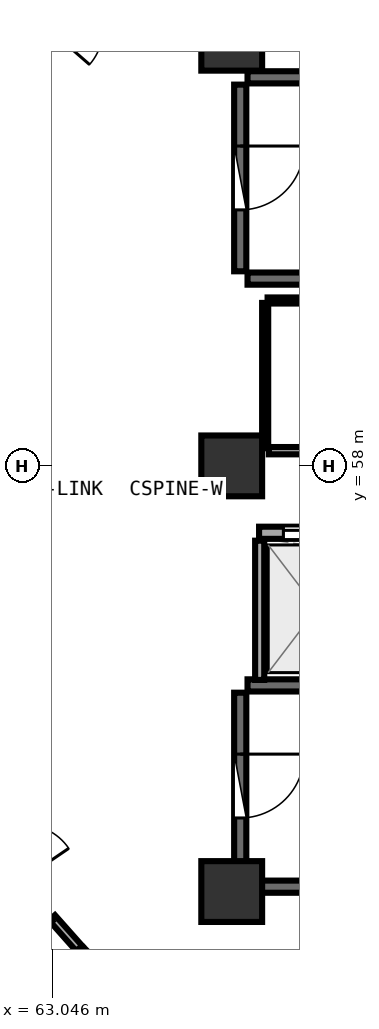
"""IFC4 building model, lengths in metres.
Left out: names, types, materials, properties, quantities, classifications, styles, units other than length and angle.
Written with IfcOpenShell. Run it as: python <this file> out.ifc"""

import sys

from ifc_helpers import new_model, si_unit, direction, frame, frame_2d, origin, origin_2d, place, context, subcontext, project, spatial, rectangle, extrude, element, fill, save


model = new_model("IFC4")
c1 = context("Model", 3, precision=1e-05, world=origin(), true_north=direction((0.0, 1.0)))
c2 = subcontext(c1, "Body", "Model", "MODEL_VIEW")
j1 = project(units=[si_unit("LENGTHUNIT", "METRE"), si_unit("PLANEANGLEUNIT", "RADIAN")], contexts=[c1])
p1 = place(None, origin())
s1 = spatial("IfcSite", under=j1, at=p1, CompositionType="ELEMENT")
p2 = place(p1, origin())
s2 = spatial("IfcBuilding", under=s1, at=p2, CompositionType="ELEMENT")
p3 = place(p2, frame((0.0, 0.0, 234.45)))
s3 = spatial("IfcBuildingStorey", under=s2, at=p3, CompositionType="ELEMENT", Elevation=234.45)
for number, where, z_axis, x_axis in (
    (1, (66.0, 51.0, 0.0), (0.0, 0.0, 1.0), (1.0, 0.0, 0.0)),
    (2, (66.0, 65.0, 0.0), (0.0, 0.0, 1.0), (1.0, 0.0, 0.0)),
    (3, (66.0, 58.0, 0.0), (0.0, 0.0, 1.0), (1.0, 0.0, 0.0)),
):
    element("IfcColumn", number, at=place(p3, frame(where, z_axis=z_axis, x_axis=x_axis)), inside=s3, PredefinedType="PILASTER", context=c2, shape_type="SweptSolid", body=[
        extrude(rectangle(XDim=1.0, YDim=1.0, at=origin_2d()), origin(), (0.0, 0.0, 1.0), 3.75),
    ])
for number, where, z_axis, x_axis in (
    (4, (66.26, 61.08, 0.0), (0.0, 0.0, 1.0), (1.0, 0.0, 0.0)),
    (5, (73.42, 64.39, 0.0), (0.0, 0.0, 1.0), (-1.0, 0.0, 0.0)),
):
    element("IfcWall", number, at=place(p3, frame(where, z_axis=z_axis, x_axis=x_axis)), inside=s3, PredefinedType="SHEAR", context=c2, shape_type="SweptSolid", body=[
        extrude(rectangle(XDim=7.16, YDim=0.2, at=frame_2d((3.58, 0.0))), origin(), (0.0, 0.0, 1.0), 3.49),
    ])
p4 = place(p3, frame((66.14, 64.27, 0.0), z_axis=(0.0, 0.0, 1.0), x_axis=(0.0, -1.0, 0.0)))
e6 = element("IfcWall", 6, at=p4, inside=s3, PredefinedType="SHEAR", context=c2, shape_type="SweptSolid", body=[
    extrude(rectangle(XDim=3.07, YDim=0.2, at=frame_2d((1.535, 0.0))), origin(), (0.0, 0.0, 1.0), 3.49),
])
p5 = place(p4, frame((1.01, 0.0, 0.0)))
e7 = element("IfcOpeningElement", 7, at=p5, cuts=e6, PredefinedType="OPENING", context=c2, shape_type="SweptSolid", body=[
    extrude(rectangle(XDim=1.05, YDim=2.1, at=frame_2d((0.525, 1.05))), frame((0.0, 0.11, 0.0), z_axis=(0.0, -1.0, 0.0), x_axis=(1.0, 0.0, 0.0)), (0.0, 0.0, 1.0), 0.22),
])
for number, where, z_axis, x_axis in (
    (8, (66.26, 51.08, 0.0), (0.0, 0.0, 1.0), (1.0, 0.0, 0.0)),
    (9, (73.42, 54.39, 0.0), (0.0, 0.0, 1.0), (-1.0, 0.0, 0.0)),
):
    element("IfcWall", number, at=place(p3, frame(where, z_axis=z_axis, x_axis=x_axis)), inside=s3, PredefinedType="SHEAR", context=c2, shape_type="SweptSolid", body=[
        extrude(rectangle(XDim=7.16, YDim=0.2, at=frame_2d((3.58, 0.0))), origin(), (0.0, 0.0, 1.0), 3.49),
    ])
p6 = place(p3, frame((66.14, 54.27, 0.0), z_axis=(0.0, 0.0, 1.0), x_axis=(0.0, -1.0, 0.0)))
e10 = element("IfcWall", 10, at=p6, inside=s3, PredefinedType="SHEAR", context=c2, shape_type="SweptSolid", body=[
    extrude(rectangle(XDim=3.07, YDim=0.2, at=frame_2d((1.535, 0.0))), origin(), (0.0, 0.0, 1.0), 3.49),
])
p7 = place(p6, frame((1.01, 0.0, 0.0)))
e11 = element("IfcOpeningElement", 11, at=p7, cuts=e10, PredefinedType="OPENING", context=c2, shape_type="SweptSolid", body=[
    extrude(rectangle(XDim=1.05, YDim=2.1, at=frame_2d((0.525, 1.05))), frame((0.0, 0.11, 0.0), z_axis=(0.0, -1.0, 0.0), x_axis=(1.0, 0.0, 0.0)), (0.0, 0.0, 1.0), 0.22),
])
p8 = place(p3, frame((66.45, 56.9, 0.0), z_axis=(0.0, 0.0, 1.0), x_axis=(1.0, 0.0, 0.0)))
e12 = element("IfcWall", 12, at=p8, inside=s3, PredefinedType="SOLIDWALL", context=c2, shape_type="SweptSolid", body=[
    extrude(rectangle(XDim=14.4, YDim=0.2, at=frame_2d((7.2, 0.0))), origin(), (0.0, 0.0, 1.0), 3.48),
])
p9 = place(p8, frame((0.4, 0.0, 0.0)))
e13 = element("IfcOpeningElement", 13, at=p9, cuts=e12, PredefinedType="OPENING", context=c2, shape_type="SweptSolid", body=[
    extrude(rectangle(XDim=1.1, YDim=2.1, at=frame_2d((0.55, 1.05))), frame((0.0, 0.11, 0.0), z_axis=(0.0, -1.0, 0.0), x_axis=(1.0, 0.0, 0.0)), (0.0, 0.0, 1.0), 0.22),
])
p10 = place(p8, frame((2.4, 0.0, 0.0)))
e14 = element("IfcOpeningElement", 14, at=p10, cuts=e12, PredefinedType="OPENING", context=c2, shape_type="SweptSolid", body=[
    extrude(rectangle(XDim=1.1, YDim=2.1, at=frame_2d((0.55, 1.05))), frame((0.0, 0.11, 0.0), z_axis=(0.0, -1.0, 0.0), x_axis=(1.0, 0.0, 0.0)), (0.0, 0.0, 1.0), 0.22),
])
p11 = place(p8, frame((4.4, 0.0, 0.0)))
e15 = element("IfcOpeningElement", 15, at=p11, cuts=e12, PredefinedType="OPENING", context=c2, shape_type="SweptSolid", body=[
    extrude(rectangle(XDim=1.1, YDim=2.1, at=frame_2d((0.55, 1.05))), frame((0.0, 0.11, 0.0), z_axis=(0.0, -1.0, 0.0), x_axis=(1.0, 0.0, 0.0)), (0.0, 0.0, 1.0), 0.22),
])
p12 = place(p3, frame((66.46, 54.48, 0.0), z_axis=(0.0, 0.0, 1.0), x_axis=(0.0, 1.0, 0.0)))
e16 = element("IfcWall", 16, at=p12, inside=s3, PredefinedType="PARTITIONING", context=c2, shape_type="SweptSolid", body=[
    extrude(rectangle(XDim=2.29, YDim=0.15, at=frame_2d((1.145, 0.0))), origin(), (0.0, 0.0, 1.0), 3.48),
])
p13 = place(p3, frame((66.61, 58.25, 0.0), z_axis=(0.0, 0.0, 1.0), x_axis=(1.0, 0.0, 0.0)))
e17 = element("IfcWall", 17, at=p13, inside=s3, PredefinedType="PARTITIONING", context=c2, shape_type="SweptSolid", body=[
    extrude(rectangle(XDim=5.78, YDim=0.12, at=frame_2d((2.89, 0.0))), origin(), (0.0, 0.0, 1.0), 3.48),
])
p14 = place(p13, frame((2.44, 0.0, 0.0)))
e18 = element("IfcOpeningElement", 18, at=p14, cuts=e17, PredefinedType="OPENING", context=c2, shape_type="SweptSolid", body=[
    extrude(rectangle(XDim=0.9, YDim=2.08, at=frame_2d((0.45, 1.04))), frame((0.0, 0.07, 0.0), z_axis=(0.0, -1.0, 0.0), x_axis=(1.0, 0.0, 0.0)), (0.0, 0.0, 1.0), 0.14),
])
p15 = place(p3, frame((64.352, 66.763, 0.0), z_axis=(0.0, 0.0, 1.0), x_axis=(-0.656587461417, -0.75424989593, 0.0)))
e19 = element("IfcWall", 19, at=p15, inside=s3, PredefinedType="PARTITIONING", context=c2, shape_type="SweptSolid", body=[
    extrude(rectangle(XDim=3.267, YDim=0.12, at=frame_2d((1.634, 0.0))), origin(), (0.0, 0.0, 1.0), 3.025),
])
p16 = place(p15, frame((1.184, 0.0, 0.0)))
e20 = element("IfcOpeningElement", 20, at=p16, cuts=e19, PredefinedType="OPENING", context=c2, shape_type="SweptSolid", body=[
    extrude(rectangle(XDim=0.9, YDim=2.08, at=frame_2d((0.45, 1.04))), frame((0.0, 0.07, 0.0), z_axis=(0.0, -1.0, 0.0), x_axis=(1.0, 0.0, 0.0)), (0.0, 0.0, 1.0), 0.14),
])
p17 = place(p3, frame((72.41, 60.72, 0.0), z_axis=(0.0, 0.0, 1.0), x_axis=(-1.0, 0.0, 0.0)))
e21 = element("IfcWall", 21, at=p17, inside=s3, PredefinedType="PARTITIONING", context=c2, shape_type="SweptSolid", body=[
    extrude(rectangle(XDim=5.82, YDim=0.1, at=frame_2d((2.91, 0.0))), origin(), (0.0, 0.0, 1.0), 3.48),
])
p18 = place(p3, frame((66.55, 60.68, 0.0), z_axis=(0.0, 0.0, 1.0), x_axis=(0.0, -1.0, 0.0)))
e22 = element("IfcWall", 22, at=p18, inside=s3, PredefinedType="PARTITIONING", context=c2, shape_type="SweptSolid", body=[
    extrude(rectangle(XDim=2.39, YDim=0.1, at=frame_2d((1.195, 0.0))), origin(), (0.0, 0.0, 1.0), 3.48),
])
p19 = place(p3, frame((63.044, 50.569, 0.0), z_axis=(0.0, 0.0, 1.0), x_axis=(0.663846659507, -0.74786871352, 0.0)))
e23 = element("IfcWall", 23, at=p19, inside=s3, PredefinedType="PLUMBINGWALL", context=c2, shape_type="SweptSolid", body=[
    extrude(rectangle(XDim=0.674, YDim=0.13, at=frame_2d((0.337, 0.0))), origin(), (0.0, 0.0, 1.0), 3.48),
])
p20 = place(p3, frame((63.519, 50.036, 0.0), z_axis=(0.0, 0.0, 1.0), x_axis=(0.704946592253, -0.70926039088, 0.0)))
e24 = element("IfcWall", 24, at=p20, inside=s3, PredefinedType="PLUMBINGWALL", context=c2, shape_type="SweptSolid", body=[
    extrude(rectangle(XDim=0.679, YDim=0.13, at=frame_2d((0.34, 0.0))), origin(), (0.0, 0.0, 1.0), 3.025),
])
p21 = place(p3, frame((60.603, 48.941, 0.0), z_axis=(0.0, 0.0, 1.0), x_axis=(0.828277690913, 0.560317826538, 0.0)))
e25 = element("IfcWall", 25, at=p21, inside=s3, PredefinedType="PLUMBINGWALL", context=c2, shape_type="SweptSolid", body=[
    extrude(rectangle(XDim=2.912, YDim=0.13, at=frame_2d((1.456, 0.0))), origin(), (0.0, 0.0, 1.0), 3.235),
])
p22 = place(p5, origin())
e26 = element("IfcDoor", 26, at=p22, inside=s3, OperationType="SINGLE_SWING_LEFT", PredefinedType="DOOR", context=c2, shape_type="SweptSolid", body=[
    extrude(rectangle(XDim=1.05, YDim=2.1, at=frame_2d((0.525, 1.05))), frame((0.0, 0.025, 0.0), z_axis=(0.0, -1.0, 0.0), x_axis=(1.0, 0.0, 0.0)), (0.0, 0.0, 1.0), 0.05),
])
fill(e7, e26)
p23 = place(p7, origin())
e27 = element("IfcDoor", 27, at=p23, inside=s3, OperationType="SINGLE_SWING_LEFT", PredefinedType="DOOR", context=c2, shape_type="SweptSolid", body=[
    extrude(rectangle(XDim=1.05, YDim=2.1, at=frame_2d((0.525, 1.05))), frame((0.0, 0.025, 0.0), z_axis=(0.0, -1.0, 0.0), x_axis=(1.0, 0.0, 0.0)), (0.0, 0.0, 1.0), 0.05),
])
fill(e11, e27)
p24 = place(p9, origin())
e28 = element("IfcDoor", 28, at=p24, inside=s3, OperationType="DOUBLE_DOOR_SLIDING", PredefinedType="DOOR", context=c2, shape_type="SweptSolid", body=[
    extrude(rectangle(XDim=1.1, YDim=2.1, at=frame_2d((0.55, 1.05))), frame((0.0, 0.025, 0.0), z_axis=(0.0, -1.0, 0.0), x_axis=(1.0, 0.0, 0.0)), (0.0, 0.0, 1.0), 0.05),
])
fill(e13, e28)
save(model, sys.argv[1])
